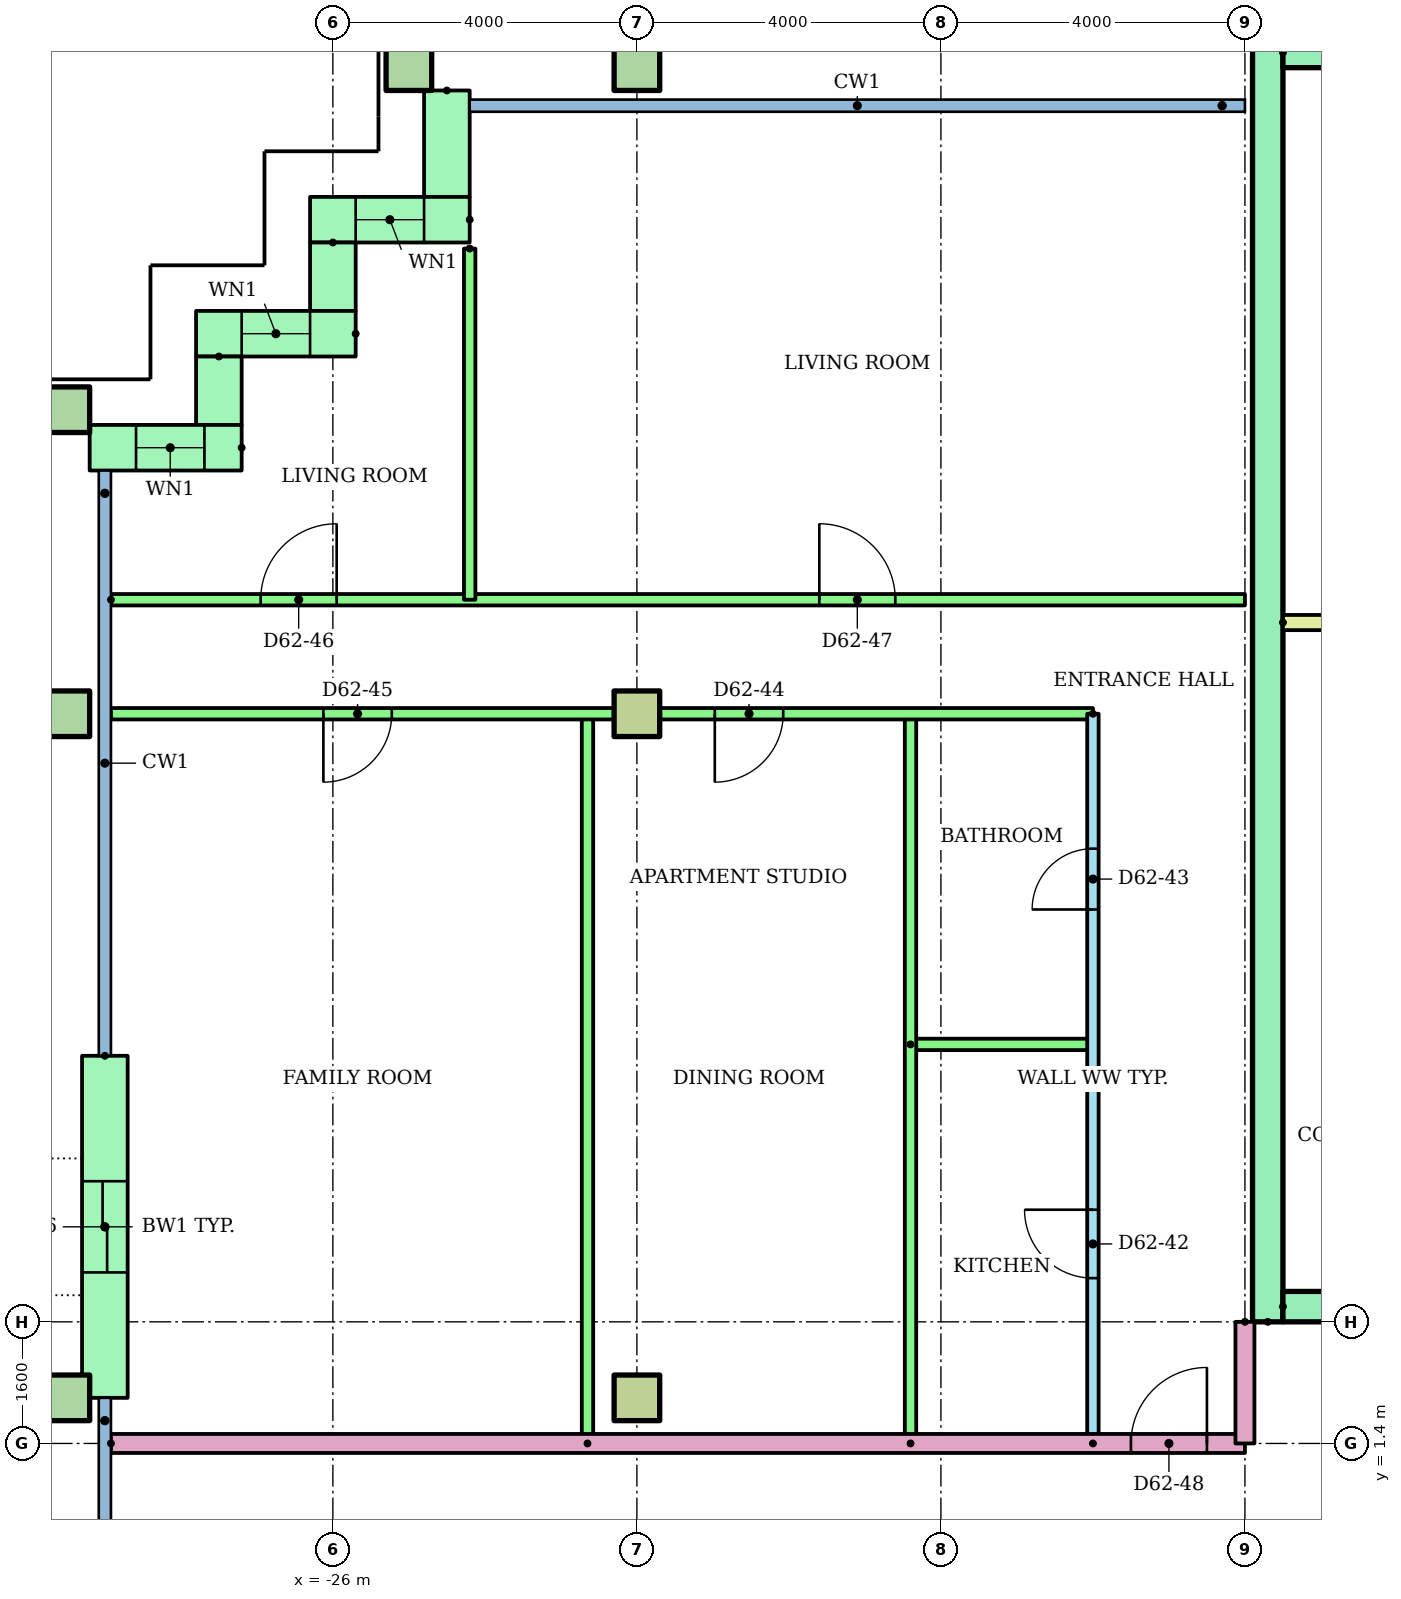
"""IFC4 building model, lengths in metres.
Left out: names, types, materials, properties, quantities, classifications, styles, units other than length and angle.
Written with IfcOpenShell. Run it as: python <this file> out.ifc"""

import sys

from ifc_helpers import new_model, si_unit, direction, frame, frame_2d, origin, origin_2d, place, context, subcontext, project, spatial, rectangle, hollow_rectangle, extrude, element, fill, save


model = new_model("IFC4")
c1 = context("Model", 3, precision=1e-05, world=origin(), true_north=direction((0.0, 1.0)))
c2 = subcontext(c1, "Body", "Model", "MODEL_VIEW")
j1 = project(units=[si_unit("LENGTHUNIT", "METRE"), si_unit("PLANEANGLEUNIT", "RADIAN")], contexts=[c1])
p1 = place(None, origin())
s1 = spatial("IfcSite", under=j1, at=p1, CompositionType="ELEMENT")
p2 = place(p1, origin())
s2 = spatial("IfcBuilding", under=s1, at=p2, CompositionType="ELEMENT")
p3 = place(p2, frame((0.0, 0.0, 236.4)))
s3 = spatial("IfcBuildingStorey", under=s2, at=p3, CompositionType="ELEMENT", Elevation=236.4)
p4 = place(p3, frame((-29.5, 2.0, 0.0)))
e1 = element("IfcColumn", 1, at=p4, inside=s3, PredefinedType="COLUMN", context=c2, shape_type="SweptSolid", body=[
    extrude(hollow_rectangle(XDim=0.6, YDim=0.6, WallThickness=0.03, at=origin_2d()), origin(), (0.0, 0.0, 1.0), 3.2),
])
p5 = place(p3, frame((-22.0, 2.0, 0.0)))
e2 = element("IfcColumn", 2, at=p5, inside=s3, PredefinedType="COLUMN", context=c2, shape_type="SweptSolid", body=[
    extrude(rectangle(XDim=0.6, YDim=0.6, at=origin_2d()), origin(), (0.0, 0.0, 1.0), 3.2),
])
p6 = place(p3, frame((-29.5, 11.0, 0.0)))
e3 = element("IfcColumn", 3, at=p6, inside=s3, PredefinedType="COLUMN", context=c2, shape_type="SweptSolid", body=[
    extrude(hollow_rectangle(XDim=0.6, YDim=0.6, WallThickness=0.03, at=origin_2d()), origin(), (0.0, 0.0, 1.0), 3.2),
])
p7 = place(p3, frame((-22.0, 11.0, 0.0)))
e4 = element("IfcColumn", 4, at=p7, inside=s3, PredefinedType="COLUMN", context=c2, shape_type="SweptSolid", body=[
    extrude(rectangle(XDim=0.6, YDim=0.6, at=origin_2d()), origin(), (0.0, 0.0, 1.0), 3.2),
])
for number, where in (
    (5, (-29.5, 15.0, 0.0)),
    (6, (-25.0, 19.5, 0.0)),
    (7, (-22.0, 19.5, 0.0)),
):
    element("IfcColumn", number, at=place(p3, frame(where)), inside=s3, PredefinedType="COLUMN", context=c2, shape_type="SweptSolid", body=[
        extrude(hollow_rectangle(XDim=0.6, YDim=0.6, WallThickness=0.03, at=origin_2d()), origin(), (0.0, 0.0, 1.0), 3.2),
    ])
p8 = place(p3, frame((-24.5, 19.2, 0.0), z_axis=(0.0, 0.0, 1.0), x_axis=(0.0, -1.0, 0.0)))
e8 = element("IfcWall", 8, at=p8, inside=s3, PredefinedType="STANDARD", context=c2, shape_type="SweptSolid", body=[
    extrude(rectangle(XDim=1.4, YDim=0.6, at=frame_2d((0.7, 0.0))), origin(), (0.0, 0.0, 1.0), 2.8),
])
p9 = place(p3, frame((-24.2, 17.5, 0.0), z_axis=(0.0, 0.0, 1.0), x_axis=(-1.0, 0.0, 0.0)))
e9 = element("IfcWall", 9, at=p9, inside=s3, PredefinedType="STANDARD", context=c2, shape_type="SweptSolid", body=[
    extrude(rectangle(XDim=2.1, YDim=0.6, at=frame_2d((1.05, 0.0))), origin(), (0.0, 0.0, 1.0), 2.8),
])
p10 = place(p9, frame((0.6, 0.0, 0.9)))
e10 = element("IfcOpeningElement", 10, at=p10, cuts=e9, PredefinedType="OPENING", context=c2, shape_type="SweptSolid", body=[
    extrude(rectangle(XDim=0.9, YDim=1.5, at=frame_2d((0.45, 0.75))), frame((0.0, 0.31, 0.0), z_axis=(0.0, -1.0, 0.0), x_axis=(1.0, 0.0, 0.0)), (0.0, 0.0, 1.0), 0.62),
])
p11 = place(p3, frame((-26.0, 17.2, 0.0), z_axis=(0.0, 0.0, 1.0), x_axis=(0.0, -1.0, 0.0)))
e11 = element("IfcWall", 11, at=p11, inside=s3, PredefinedType="STANDARD", context=c2, shape_type="SweptSolid", body=[
    extrude(rectangle(XDim=0.9, YDim=0.6, at=frame_2d((0.45, 0.0))), origin(), (0.0, 0.0, 1.0), 2.8),
])
p12 = place(p3, frame((-25.7, 16.0, 0.0), z_axis=(0.0, 0.0, 1.0), x_axis=(-1.0, 0.0, 0.0)))
e12 = element("IfcWall", 12, at=p12, inside=s3, PredefinedType="STANDARD", context=c2, shape_type="SweptSolid", body=[
    extrude(rectangle(XDim=2.1, YDim=0.6, at=frame_2d((1.05, 0.0))), origin(), (0.0, 0.0, 1.0), 2.8),
])
p13 = place(p12, frame((0.6, 0.0, 0.9)))
e13 = element("IfcOpeningElement", 13, at=p13, cuts=e12, PredefinedType="OPENING", context=c2, shape_type="SweptSolid", body=[
    extrude(rectangle(XDim=0.9, YDim=1.5, at=frame_2d((0.45, 0.75))), frame((0.0, 0.31, 0.0), z_axis=(0.0, -1.0, 0.0), x_axis=(1.0, 0.0, 0.0)), (0.0, 0.0, 1.0), 0.62),
])
p14 = place(p3, frame((-27.5, 15.7, 0.0), z_axis=(0.0, 0.0, 1.0), x_axis=(0.0, -1.0, 0.0)))
e14 = element("IfcWall", 14, at=p14, inside=s3, PredefinedType="STANDARD", context=c2, shape_type="SweptSolid", body=[
    extrude(rectangle(XDim=0.9, YDim=0.6, at=frame_2d((0.45, 0.0))), origin(), (0.0, 0.0, 1.0), 2.8),
])
p15 = place(p3, frame((-27.2, 14.5, 0.0), z_axis=(0.0, 0.0, 1.0), x_axis=(-1.0, 0.0, 0.0)))
e15 = element("IfcWall", 15, at=p15, inside=s3, PredefinedType="STANDARD", context=c2, shape_type="SweptSolid", body=[
    extrude(rectangle(XDim=2.0, YDim=0.6, at=frame_2d((1.0, 0.0))), origin(), (0.0, 0.0, 1.0), 2.8),
])
p16 = place(p15, frame((0.49, 0.0, 0.9)))
e16 = element("IfcOpeningElement", 16, at=p16, cuts=e15, PredefinedType="OPENING", context=c2, shape_type="SweptSolid", body=[
    extrude(rectangle(XDim=0.9, YDim=1.5, at=frame_2d((0.45, 0.75))), frame((0.0, 0.31, 0.0), z_axis=(0.0, -1.0, 0.0), x_axis=(1.0, 0.0, 0.0)), (0.0, 0.0, 1.0), 0.62),
])
p17 = place(p3, frame((-29.0, 6.5, 0.0), z_axis=(0.0, 0.0, 1.0), x_axis=(0.0, -1.0, 0.0)))
e17 = element("IfcWall", 17, at=p17, inside=s3, PredefinedType="STANDARD", context=c2, shape_type="SweptSolid", body=[
    extrude(rectangle(XDim=4.5, YDim=0.6, at=frame_2d((2.25, 0.0))), origin(), (0.0, 0.0, 1.0), 2.8),
])
p18 = place(p17, frame((1.65, 0.0, 0.0)))
e18 = element("IfcOpeningElement", 18, at=p18, cuts=e17, PredefinedType="OPENING", context=c2, shape_type="SweptSolid", body=[
    extrude(rectangle(XDim=1.2, YDim=2.1, at=frame_2d((0.6, 1.05))), frame((0.0, 0.31, 0.0), z_axis=(0.0, -1.0, 0.0), x_axis=(1.0, 0.0, 0.0)), (0.0, 0.0, 1.0), 0.62),
])
p19 = place(p3, frame((-13.7, 3.0, 0.0), z_axis=(0.0, 0.0, 1.0), x_axis=(0.0, 1.0, 0.0)))
e19 = element("IfcWall", 19, at=p19, inside=s3, PredefinedType="SHEAR", context=c2, shape_type="SweptSolid", body=[
    extrude(rectangle(XDim=17.0, YDim=0.4, at=frame_2d((8.5, 0.0))), origin(), (0.0, 0.0, 1.0), 2.8),
])
p20 = place(p3, frame((-13.5, 19.7, 0.0)))
e20 = element("IfcWall", 20, at=p20, inside=s3, PredefinedType="SHEAR", context=c2, shape_type="SweptSolid", body=[
    extrude(rectangle(XDim=27.0, YDim=0.4, at=frame_2d((13.5, 0.0))), origin(), (0.0, 0.0, 1.0), 2.8),
])
p21 = place(p3, frame((-13.5, 3.2, 0.0)))
e21 = element("IfcWall", 21, at=p21, inside=s3, PredefinedType="SHEAR", context=c2, shape_type="SweptSolid", body=[
    extrude(rectangle(XDim=27.0, YDim=0.4, at=frame_2d((13.5, 0.0))), origin(), (0.0, 0.0, 1.0), 2.8),
])
p22 = place(p21, frame((22.083, 0.0, 0.0)))
e22 = element("IfcOpeningElement", 22, at=p22, cuts=e21, PredefinedType="OPENING", context=c2, shape_type="SweptSolid", body=[
    extrude(rectangle(XDim=1.1, YDim=2.1, at=frame_2d((0.55, 1.05))), frame((0.0, 0.21, 0.0), z_axis=(0.0, -1.0, 0.0), x_axis=(1.0, 0.0, 0.0)), (0.0, 0.0, 1.0), 0.42),
])
p23 = place(p21, frame((25.128, 0.0, 0.0)))
e23 = element("IfcOpeningElement", 23, at=p23, cuts=e21, PredefinedType="OPENING", context=c2, shape_type="SweptSolid", body=[
    extrude(rectangle(XDim=1.1, YDim=2.1, at=frame_2d((0.55, 1.05))), frame((0.0, 0.21, 0.0), z_axis=(0.0, -1.0, 0.0), x_axis=(1.0, 0.0, 0.0)), (0.0, 0.0, 1.0), 0.42),
])
p24 = place(p21, frame((12.6, 0.0, 0.0)))
e24 = element("IfcOpeningElement", 24, at=p24, cuts=e21, PredefinedType="OPENING", context=c2, shape_type="SweptSolid", body=[
    extrude(rectangle(XDim=1.8, YDim=2.1, at=frame_2d((0.9, 1.05))), frame((0.0, 0.21, 0.0), z_axis=(0.0, -1.0, 0.0), x_axis=(1.0, 0.0, 0.0)), (0.0, 0.0, 1.0), 0.42),
])
p25 = place(p3, frame((-13.5, 12.2, 0.0)))
e25 = element("IfcWall", 25, at=p25, inside=s3, PredefinedType="PARTITIONING", context=c2, shape_type="SweptSolid", body=[
    extrude(rectangle(XDim=3.9, YDim=0.2, at=frame_2d((1.95, 0.0))), origin(), (0.0, 0.0, 1.0), 2.8),
])
p26 = place(p3, frame((-16.0, 1.4, 0.0), z_axis=(0.0, 0.0, 1.0), x_axis=(0.0, 1.0, 0.0)))
e26 = element("IfcWall", 26, at=p26, inside=s3, PredefinedType="PARTITIONING", context=c2, shape_type="SweptSolid", body=[
    extrude(rectangle(XDim=9.6, YDim=0.15, at=frame_2d((4.8, 0.0))), origin(), (0.0, 0.0, 1.0), 2.4),
])
p27 = place(p26, frame((2.175, 0.0, 0.0)))
e27 = element("IfcOpeningElement", 27, at=p27, cuts=e26, PredefinedType="OPENING", context=c2, shape_type="SweptSolid", body=[
    extrude(rectangle(XDim=0.9, YDim=2.1, at=frame_2d((0.45, 1.05))), frame((0.0, 0.085, 0.0), z_axis=(0.0, -1.0, 0.0), x_axis=(1.0, 0.0, 0.0)), (0.0, 0.0, 1.0), 0.17),
])
p28 = place(p26, frame((7.025, 0.0, 0.0)))
e28 = element("IfcOpeningElement", 28, at=p28, cuts=e26, PredefinedType="OPENING", context=c2, shape_type="SweptSolid", body=[
    extrude(rectangle(XDim=0.8, YDim=2.1, at=frame_2d((0.4, 1.05))), frame((0.0, 0.085, 0.0), z_axis=(0.0, -1.0, 0.0), x_axis=(1.0, 0.0, 0.0)), (0.0, 0.0, 1.0), 0.17),
])
p29 = place(p3, frame((-18.4, 6.65, 0.0)))
e29 = element("IfcWall", 29, at=p29, inside=s3, PredefinedType="PARTITIONING", context=c2, shape_type="SweptSolid", body=[
    extrude(rectangle(XDim=2.4, YDim=0.15, at=frame_2d((1.2, 0.0))), origin(), (0.0, 0.0, 1.0), 2.4),
])
for number, where, z_axis, x_axis in (
    (30, (-18.4, 1.4, 0.0), (0.0, 0.0, 1.0), (0.0, 1.0, 0.0)),
    (31, (-22.65, 1.4, 0.0), (0.0, 0.0, 1.0), (0.0, 1.0, 0.0)),
):
    element("IfcWall", number, at=place(p3, frame(where, z_axis=z_axis, x_axis=x_axis)), inside=s3, PredefinedType="PARTITIONING", context=c2, shape_type="SweptSolid", body=[
        extrude(rectangle(XDim=9.6, YDim=0.15, at=frame_2d((4.8, 0.0))), origin(), (0.0, 0.0, 1.0), 2.4),
    ])
p30 = place(p3, frame((-16.0, 11.0, 0.0), z_axis=(0.0, 0.0, 1.0), x_axis=(-1.0, 0.0, 0.0)))
e32 = element("IfcWall", 32, at=p30, inside=s3, PredefinedType="PARTITIONING", context=c2, shape_type="SweptSolid", body=[
    extrude(rectangle(XDim=12.92, YDim=0.15, at=frame_2d((6.46, 0.0))), origin(), (0.0, 0.0, 1.0), 2.4),
])
p31 = place(p30, frame((4.075, 0.0, 0.0)))
e33 = element("IfcOpeningElement", 33, at=p31, cuts=e32, PredefinedType="OPENING", context=c2, shape_type="SweptSolid", body=[
    extrude(rectangle(XDim=0.9, YDim=2.1, at=frame_2d((0.45, 1.05))), frame((0.0, 0.085, 0.0), z_axis=(0.0, -1.0, 0.0), x_axis=(1.0, 0.0, 0.0)), (0.0, 0.0, 1.0), 0.17),
])
p32 = place(p30, frame((9.225, 0.0, 0.0)))
e34 = element("IfcOpeningElement", 34, at=p32, cuts=e32, PredefinedType="OPENING", context=c2, shape_type="SweptSolid", body=[
    extrude(rectangle(XDim=0.9, YDim=2.1, at=frame_2d((0.45, 1.05))), frame((0.0, 0.085, 0.0), z_axis=(0.0, -1.0, 0.0), x_axis=(1.0, 0.0, 0.0)), (0.0, 0.0, 1.0), 0.17),
])
p33 = place(p3, frame((-28.92, 12.5, 0.0)))
e35 = element("IfcWall", 35, at=p33, inside=s3, PredefinedType="PARTITIONING", context=c2, shape_type="SweptSolid", body=[
    extrude(rectangle(XDim=14.92, YDim=0.15, at=frame_2d((7.46, 0.0))), origin(), (0.0, 0.0, 1.0), 2.4),
])
p34 = place(p33, frame((1.97, 0.0, 0.0)))
e36 = element("IfcOpeningElement", 36, at=p34, cuts=e35, PredefinedType="OPENING", context=c2, shape_type="SweptSolid", body=[
    extrude(rectangle(XDim=1.0, YDim=2.1, at=frame_2d((0.5, 1.05))), frame((0.0, 0.085, 0.0), z_axis=(0.0, -1.0, 0.0), x_axis=(1.0, 0.0, 0.0)), (0.0, 0.0, 1.0), 0.17),
])
p35 = place(p33, frame((9.32, 0.0, 0.0)))
e37 = element("IfcOpeningElement", 37, at=p35, cuts=e35, PredefinedType="OPENING", context=c2, shape_type="SweptSolid", body=[
    extrude(rectangle(XDim=1.0, YDim=2.1, at=frame_2d((0.5, 1.05))), frame((0.0, 0.085, 0.0), z_axis=(0.0, -1.0, 0.0), x_axis=(1.0, 0.0, 0.0)), (0.0, 0.0, 1.0), 0.17),
])
p36 = place(p3, frame((-24.2, 17.12, 0.0), z_axis=(0.0, 0.0, 1.0), x_axis=(0.0, -1.0, 0.0)))
e38 = element("IfcWall", 38, at=p36, inside=s3, PredefinedType="PARTITIONING", context=c2, shape_type="SweptSolid", body=[
    extrude(rectangle(XDim=4.62, YDim=0.15, at=frame_2d((2.31, 0.0))), origin(), (0.0, 0.0, 1.0), 2.4),
])
p37 = place(p3, frame((-28.92, 1.4, 0.0)))
e39 = element("IfcWall", 39, at=p37, inside=s3, PredefinedType="PARTITIONING", context=c2, shape_type="SweptSolid", body=[
    extrude(rectangle(XDim=14.92, YDim=0.25, at=frame_2d((7.46, 0.0))), origin(), (0.0, 0.0, 1.0), 2.4),
])
p38 = place(p37, frame((13.42, 0.0, 0.0)))
e40 = element("IfcOpeningElement", 40, at=p38, cuts=e39, PredefinedType="OPENING", context=c2, shape_type="SweptSolid", body=[
    extrude(rectangle(XDim=1.0, YDim=2.1, at=frame_2d((0.5, 1.05))), frame((0.0, 0.135, 0.0), z_axis=(0.0, -1.0, 0.0), x_axis=(1.0, 0.0, 0.0)), (0.0, 0.0, 1.0), 0.27),
])
p39 = place(p3, frame((-14.0, 3.0, 0.0), z_axis=(0.0, 0.0, 1.0), x_axis=(0.0, -1.0, 0.0)))
e41 = element("IfcWall", 41, at=p39, inside=s3, PredefinedType="PARTITIONING", context=c2, shape_type="SweptSolid", body=[
    extrude(rectangle(XDim=1.6, YDim=0.25, at=frame_2d((0.8, 0.0))), origin(), (0.0, 0.0, 1.0), 2.4),
])
p40 = place(p10, origin())
e42 = element("IfcWindow", 42, at=p40, inside=s3, PartitioningType="SINGLE_PANEL", PredefinedType="WINDOW", context=c2, shape_type="SweptSolid", body=[
    extrude(rectangle(XDim=0.9, YDim=1.5, at=frame_2d((0.45, 0.75))), frame((0.0, 0.03, 0.0), z_axis=(0.0, -1.0, 0.0), x_axis=(1.0, 0.0, 0.0)), (0.0, 0.0, 1.0), 0.06),
])
fill(e10, e42)
p41 = place(p13, origin())
e43 = element("IfcWindow", 43, at=p41, inside=s3, PartitioningType="SINGLE_PANEL", PredefinedType="WINDOW", context=c2, shape_type="SweptSolid", body=[
    extrude(rectangle(XDim=0.9, YDim=1.5, at=frame_2d((0.45, 0.75))), frame((0.0, 0.03, 0.0), z_axis=(0.0, -1.0, 0.0), x_axis=(1.0, 0.0, 0.0)), (0.0, 0.0, 1.0), 0.06),
])
fill(e13, e43)
p42 = place(p16, origin())
e44 = element("IfcWindow", 44, at=p42, inside=s3, PartitioningType="SINGLE_PANEL", PredefinedType="WINDOW", context=c2, shape_type="SweptSolid", body=[
    extrude(rectangle(XDim=0.9, YDim=1.5, at=frame_2d((0.45, 0.75))), frame((0.0, 0.03, 0.0), z_axis=(0.0, -1.0, 0.0), x_axis=(1.0, 0.0, 0.0)), (0.0, 0.0, 1.0), 0.06),
])
fill(e16, e44)
p43 = place(p27, origin())
e45 = element("IfcDoor", 45, at=p43, inside=s3, OperationType="SINGLE_SWING_RIGHT", PredefinedType="DOOR", context=c2, shape_type="SweptSolid", body=[
    extrude(rectangle(XDim=0.9, YDim=2.1, at=frame_2d((0.45, 1.05))), frame((0.0, 0.025, 0.0), z_axis=(0.0, -1.0, 0.0), x_axis=(1.0, 0.0, 0.0)), (0.0, 0.0, 1.0), 0.05),
])
fill(e27, e45)
p44 = place(p28, origin())
e46 = element("IfcDoor", 46, at=p44, inside=s3, OperationType="SINGLE_SWING_LEFT", PredefinedType="DOOR", context=c2, shape_type="SweptSolid", body=[
    extrude(rectangle(XDim=0.8, YDim=2.1, at=frame_2d((0.4, 1.05))), frame((0.0, 0.025, 0.0), z_axis=(0.0, -1.0, 0.0), x_axis=(1.0, 0.0, 0.0)), (0.0, 0.0, 1.0), 0.05),
])
fill(e28, e46)
p45 = place(p31, origin())
e47 = element("IfcDoor", 47, at=p45, inside=s3, OperationType="SINGLE_SWING_RIGHT", PredefinedType="DOOR", context=c2, shape_type="SweptSolid", body=[
    extrude(rectangle(XDim=0.9, YDim=2.1, at=frame_2d((0.45, 1.05))), frame((0.0, 0.025, 0.0), z_axis=(0.0, -1.0, 0.0), x_axis=(1.0, 0.0, 0.0)), (0.0, 0.0, 1.0), 0.05),
])
fill(e33, e47)
p46 = place(p32, origin())
e48 = element("IfcDoor", 48, at=p46, inside=s3, OperationType="SINGLE_SWING_RIGHT", PredefinedType="DOOR", context=c2, shape_type="SweptSolid", body=[
    extrude(rectangle(XDim=0.9, YDim=2.1, at=frame_2d((0.45, 1.05))), frame((0.0, 0.025, 0.0), z_axis=(0.0, -1.0, 0.0), x_axis=(1.0, 0.0, 0.0)), (0.0, 0.0, 1.0), 0.05),
])
fill(e34, e48)
p47 = place(p34, origin())
e49 = element("IfcDoor", 49, at=p47, inside=s3, OperationType="SINGLE_SWING_RIGHT", PredefinedType="DOOR", context=c2, shape_type="SweptSolid", body=[
    extrude(rectangle(XDim=1.0, YDim=2.1, at=frame_2d((0.5, 1.05))), frame((0.0, 0.025, 0.0), z_axis=(0.0, -1.0, 0.0), x_axis=(1.0, 0.0, 0.0)), (0.0, 0.0, 1.0), 0.05),
])
fill(e36, e49)
p48 = place(p35, origin())
e50 = element("IfcDoor", 50, at=p48, inside=s3, OperationType="SINGLE_SWING_LEFT", PredefinedType="DOOR", context=c2, shape_type="SweptSolid", body=[
    extrude(rectangle(XDim=1.0, YDim=2.1, at=frame_2d((0.5, 1.05))), frame((0.0, 0.025, 0.0), z_axis=(0.0, -1.0, 0.0), x_axis=(1.0, 0.0, 0.0)), (0.0, 0.0, 1.0), 0.05),
])
fill(e37, e50)
p49 = place(p38, origin())
e51 = element("IfcDoor", 51, at=p49, inside=s3, OperationType="SINGLE_SWING_RIGHT", PredefinedType="DOOR", context=c2, shape_type="SweptSolid", body=[
    extrude(rectangle(XDim=1.0, YDim=2.1, at=frame_2d((0.5, 1.05))), frame((0.0, 0.025, 0.0), z_axis=(0.0, -1.0, 0.0), x_axis=(1.0, 0.0, 0.0)), (0.0, 0.0, 1.0), 0.05),
])
fill(e40, e51)
p50 = place(p18, origin())
e52 = element("IfcDoor", 52, at=p50, inside=s3, OperationType="SLIDING_TO_LEFT", PredefinedType="DOOR", context=c2, shape_type="SweptSolid", body=[
    extrude(rectangle(XDim=1.2, YDim=2.1, at=frame_2d((0.6, 1.05))), frame((0.0, 0.025, 0.0), z_axis=(0.0, -1.0, 0.0), x_axis=(1.0, 0.0, 0.0)), (0.0, 0.0, 1.0), 0.05),
])
fill(e18, e52)
save(model, sys.argv[1])
